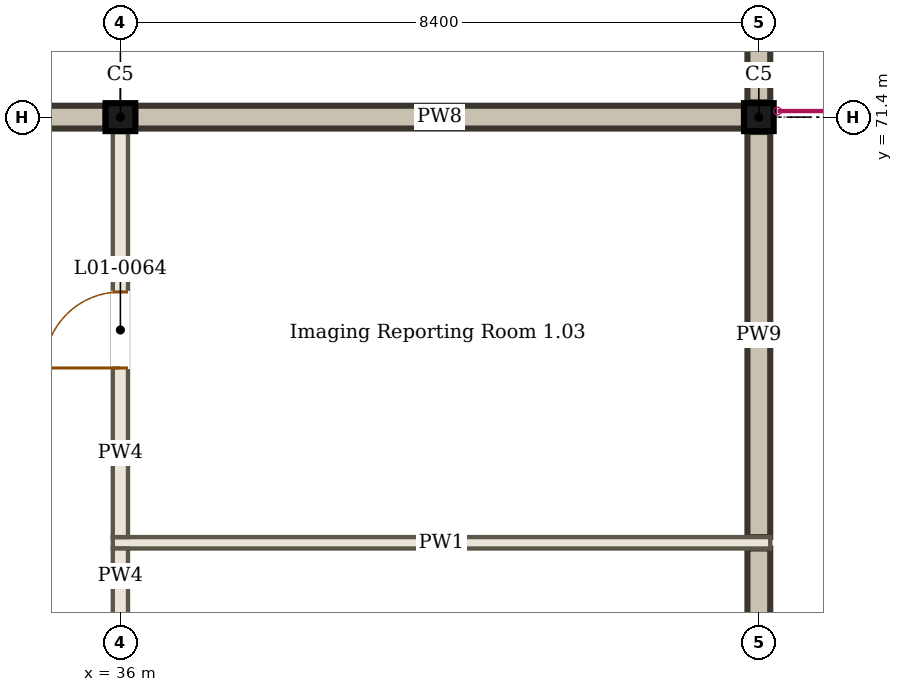
"""IFC4 building model, lengths in metres.
Left out: names, types, materials, properties, quantities, classifications, styles, units other than length and angle.
Written with IfcOpenShell. Run it as: python <this file> out.ifc"""

import sys

from ifc_helpers import new_model, si_unit, direction, frame, frame_2d, origin, origin_2d, place, context, subcontext, project, spatial, rectangle, i_section, extrude, element, fill, save


model = new_model("IFC4")
c1 = context("Model", 3, precision=1e-05, world=origin(), true_north=direction((0.0, 1.0)))
c2 = subcontext(c1, "Body", "Model", "MODEL_VIEW")
j1 = project(units=[si_unit("LENGTHUNIT", "METRE"), si_unit("PLANEANGLEUNIT", "RADIAN")], contexts=[c1])
p1 = place(None, origin())
s1 = spatial("IfcSite", under=j1, at=p1, CompositionType="ELEMENT")
p2 = place(p1, origin())
s2 = spatial("IfcBuilding", under=s1, at=p2, CompositionType="ELEMENT")
p3 = place(p2, frame((0.0, 0.0, 4.5)))
s3 = spatial("IfcBuildingStorey", under=s2, at=p3, CompositionType="ELEMENT", Elevation=4.5)
for number, where, z_axis, x_axis in (
    (1, (36.0, 71.4, 0.0), (0.0, 0.0, 1.0), (1.0, 0.0, 0.0)),
    (2, (44.4, 71.4, 0.0), (0.0, 0.0, 1.0), (1.0, 0.0, 0.0)),
):
    element("IfcColumn", number, at=place(p3, frame(where, z_axis=z_axis, x_axis=x_axis)), inside=s3, PredefinedType="COLUMN", context=c2, shape_type="SweptSolid", body=[
        extrude(i_section(OverallWidth=0.391, OverallDepth=0.368, WebThickness=0.015, FlangeThickness=0.024, FilletRadius=0.027, at=origin_2d()), origin(), (0.0, 0.0, 1.0), 4.5),
    ])
p4 = place(p3, frame((35.9, 65.8, 0.0), z_axis=(0.0, 0.0, 1.0), x_axis=(1.0, 0.0, 0.0)))
e3 = element("IfcWall", 3, at=p4, inside=s3, PredefinedType="PARTITIONING", context=c2, shape_type="SweptSolid", body=[
    extrude(rectangle(XDim=8.65, YDim=0.15, at=frame_2d((4.325, 0.0))), origin(), (0.0, 0.0, 1.0), 4.1),
])
for number, where, z_axis, x_axis in (
    (4, (27.795, 71.4, 0.0), (0.0, 0.0, 1.0), (1.0, 0.0, 0.0)),
    (5, (36.196, 71.4, 0.0), (0.0, 0.0, 1.0), (1.0, 0.0, 0.0)),
):
    element("IfcWall", number, at=place(p3, frame(where, z_axis=z_axis, x_axis=x_axis)), inside=s3, PredefinedType="SOLIDWALL", context=c2, shape_type="SweptSolid", body=[
        extrude(rectangle(XDim=8.009, YDim=0.3, at=frame_2d((4.004, 0.0))), origin(), (0.0, 0.0, 1.0), 3.85),
    ])
p5 = place(p3, frame((36.0, 63.15, 0.0), z_axis=(0.0, 0.0, 1.0), x_axis=(0.0, 1.0, 0.0)))
e6 = element("IfcWall", 6, at=p5, inside=s3, PredefinedType="PARTITIONING", context=c2, shape_type="SweptSolid", body=[
    extrude(rectangle(XDim=2.575, YDim=0.2, at=frame_2d((1.288, 0.0))), origin(), (0.0, 0.0, 1.0), 4.1),
])
p6 = place(p5, frame((0.15, 0.0, 0.0)))
e7 = element("IfcOpeningElement", 7, at=p6, cuts=e6, PredefinedType="OPENING", context=c2, shape_type="SweptSolid", body=[
    extrude(rectangle(XDim=1.0, YDim=2.1, at=frame_2d((0.5, 1.05))), frame((0.0, 0.11, 0.0), z_axis=(0.0, -1.0, 0.0), x_axis=(1.0, 0.0, 0.0)), (0.0, 0.0, 1.0), 0.22),
])
p7 = place(p3, frame((36.0, 65.875, 0.0), z_axis=(0.0, 0.0, 1.0), x_axis=(0.0, 1.0, 0.0)))
e8 = element("IfcWall", 8, at=p7, inside=s3, PredefinedType="PARTITIONING", context=c2, shape_type="SweptSolid", body=[
    extrude(rectangle(XDim=5.33, YDim=0.2, at=frame_2d((2.665, 0.0))), origin(), (0.0, 0.0, 1.0), 4.1),
])
p8 = place(p7, frame((2.225, 0.0, 0.0)))
e9 = element("IfcOpeningElement", 9, at=p8, cuts=e8, PredefinedType="OPENING", context=c2, shape_type="SweptSolid", body=[
    extrude(rectangle(XDim=1.0, YDim=2.1, at=frame_2d((0.5, 1.05))), frame((0.0, 0.11, 0.0), z_axis=(0.0, -1.0, 0.0), x_axis=(1.0, 0.0, 0.0)), (0.0, 0.0, 1.0), 0.22),
])
p9 = place(p3, frame((44.4, 63.15, 0.0), z_axis=(0.0, 0.0, 1.0), x_axis=(0.0, 1.0, 0.0)))
e10 = element("IfcWall", 10, at=p9, inside=s3, PredefinedType="SOLIDWALL", context=c2, shape_type="SweptSolid", body=[
    extrude(rectangle(XDim=2.575, YDim=0.3, at=frame_2d((1.288, 0.0))), origin(), (0.0, 0.0, 1.0), 4.1),
])
p10 = place(p3, frame((44.4, 65.875, 0.0), z_axis=(0.0, 0.0, 1.0), x_axis=(0.0, 1.0, 0.0)))
e11 = element("IfcWall", 11, at=p10, inside=s3, PredefinedType="SOLIDWALL", context=c2, shape_type="SweptSolid", body=[
    extrude(rectangle(XDim=5.33, YDim=0.3, at=frame_2d((2.665, 0.0))), origin(), (0.0, 0.0, 1.0), 4.1),
])
p11 = place(p3, frame((44.4, 71.595, 0.0), z_axis=(0.0, 0.0, 1.0), x_axis=(0.0, 1.0, 0.0)))
e12 = element("IfcWall", 12, at=p11, inside=s3, PredefinedType="SOLIDWALL", context=c2, shape_type="SweptSolid", body=[
    extrude(rectangle(XDim=8.009, YDim=0.3, at=frame_2d((4.004, 0.0))), origin(), (0.0, 0.0, 1.0), 3.85),
])
p12 = place(p8, origin())
e13 = element("IfcDoor", 13, at=p12, inside=s3, OperationType="SINGLE_SWING_LEFT", PredefinedType="DOOR", context=c2, shape_type="SweptSolid", body=[
    extrude(rectangle(XDim=1.0, YDim=2.1, at=frame_2d((0.5, 1.05))), frame((0.0, 0.025, 0.0), z_axis=(0.0, -1.0, 0.0), x_axis=(1.0, 0.0, 0.0)), (0.0, 0.0, 1.0), 0.05),
])
fill(e9, e13)
save(model, sys.argv[1])
